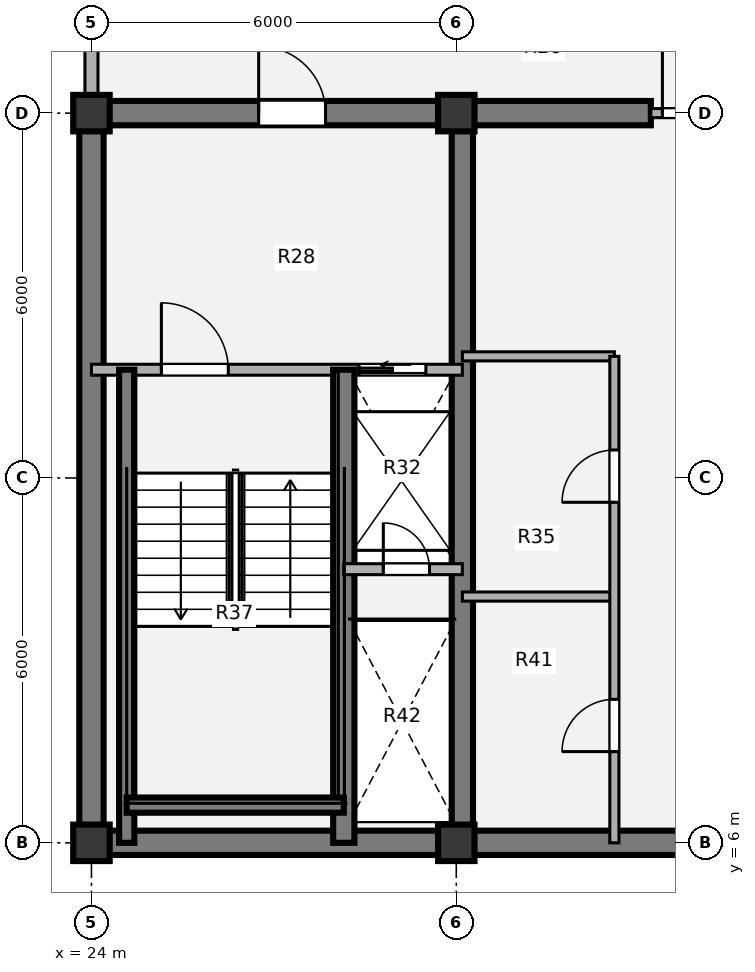
"""IFC4 building model, lengths in metres.
Left out: names, types, materials, properties, quantities, classifications, styles, units other than length and angle.
Written with IfcOpenShell. Run it as: python <this file> out.ifc"""

import sys

from ifc_helpers import new_model, si_unit, direction, frame, frame_2d, origin, origin_2d, place, context, subcontext, project, spatial, rectangle, extrude, source, transform, mapped, element, fill, save


model = new_model("IFC4")
c1 = context("Model", 3, precision=1e-05, world=origin(), true_north=direction((0.0, 1.0)))
c2 = subcontext(c1, "Body", "Model", "MODEL_VIEW")
j1 = project(units=[si_unit("LENGTHUNIT", "METRE"), si_unit("PLANEANGLEUNIT", "RADIAN")], contexts=[c1])
p1 = place(None, origin())
s1 = spatial("IfcSite", under=j1, at=p1, CompositionType="ELEMENT")
p2 = place(p1, origin())
s2 = spatial("IfcBuilding", under=s1, at=p2, CompositionType="ELEMENT")
p3 = place(p2, frame((0.0, 0.0, 238.14)))
s3 = spatial("IfcBuildingStorey", under=s2, at=p3, CompositionType="ELEMENT", Elevation=238.14)
m1 = source(origin(), c2, "Body", "SweptSolid", [
    extrude(rectangle(XDim=0.6, YDim=0.6, at=origin_2d()), origin(), (0.0, 0.0, 1.0), 3.78),
])
for number, where, z_axis, x_axis in (
    (1, (24.0, 6.0, 0.0), (0.0, 0.0, 1.0), (1.0, 0.0, 0.0)),
    (2, (30.0, 6.0, 0.0), (0.0, 0.0, 1.0), (1.0, 0.0, 0.0)),
    (3, (24.0, 18.0, 0.0), (0.0, 0.0, 1.0), (1.0, 0.0, 0.0)),
    (4, (30.0, 18.0, 0.0), (0.0, 0.0, 1.0), (1.0, 0.0, 0.0)),
):
    element("IfcColumn", number, at=place(p3, frame(where, z_axis=z_axis, x_axis=x_axis)), inside=s3, PredefinedType="COLUMN", context=c2, shape_type="MappedRepresentation", body=[
        mapped(m1, transform((0.0, 0.0, 0.0), x_axis=(1.0, 0.0, 0.0), y_axis=(0.0, 1.0, 0.0), z_axis=(0.0, 0.0, 1.0), scale=1.0)),
    ])
p4 = place(p3, frame((48.2, 6.0, 0.0), z_axis=(0.0, 0.0, 1.0), x_axis=(-1.0, 0.0, 0.0)))
e5 = element("IfcWall", 5, at=p4, inside=s3, PredefinedType="SHEAR", context=c2, shape_type="SweptSolid", body=[
    extrude(rectangle(XDim=24.4, YDim=0.4, at=frame_2d((12.2, 0.0))), origin(), (0.0, 0.0, 1.0), 3.78),
])
p5 = place(p3, frame((24.0, 6.0, 0.0), z_axis=(0.0, 0.0, 1.0), x_axis=(0.0, 1.0, 0.0)))
e6 = element("IfcWall", 6, at=p5, inside=s3, PredefinedType="SHEAR", context=c2, shape_type="SweptSolid", body=[
    extrude(rectangle(XDim=12.0, YDim=0.4, at=frame_2d((6.0, 0.0))), origin(), (0.0, 0.0, 1.0), 3.78),
])
p6 = place(p3, frame((23.8, 18.0, 0.0), z_axis=(0.0, 0.0, 1.0), x_axis=(1.0, 0.0, 0.0)))
e7 = element("IfcWall", 7, at=p6, inside=s3, PredefinedType="SHEAR", context=c2, shape_type="SweptSolid", body=[
    extrude(rectangle(XDim=9.4, YDim=0.4, at=frame_2d((4.7, 0.0))), origin(), (0.0, 0.0, 1.0), 3.78),
])
p7 = place(p6, frame((2.95, 0.0, 0.0)))
e8 = element("IfcOpeningElement", 8, at=p7, cuts=e7, PredefinedType="OPENING", context=c2, shape_type="SweptSolid", body=[
    extrude(rectangle(XDim=1.1, YDim=2.1, at=origin_2d()), frame((0.55, 0.21, 1.05), z_axis=(0.0, -1.0, 0.0), x_axis=(1.0, 0.0, 0.0)), (0.0, 0.0, 1.0), 0.42),
])
p8 = place(p3, frame((30.1, 6.0, 0.0), z_axis=(0.0, 0.0, 1.0), x_axis=(0.0, 1.0, 0.0)))
e9 = element("IfcWall", 9, at=p8, inside=s3, PredefinedType="SHEAR", context=c2, shape_type="SweptSolid", body=[
    extrude(rectangle(XDim=12.0, YDim=0.35, at=frame_2d((6.0, 0.0))), origin(), (0.0, 0.0, 1.0), 3.78),
])
p9 = place(p3, frame((24.0, 18.28, 0.0), z_axis=(0.0, 0.0, 1.0), x_axis=(0.0, 1.0, 0.0)))
e10 = element("IfcWall", 10, at=p9, inside=s3, PredefinedType="SOLIDWALL", context=c2, shape_type="SweptSolid", body=[
    extrude(rectangle(XDim=2.77, YDim=0.215, at=frame_2d((1.385, 0.0))), origin(), (0.0, 0.0, 1.0), 2.718),
])
for number, where, z_axis, x_axis in (
    (11, (30.1, 14.0, 0.0), (0.0, 0.0, 1.0), (1.0, 0.0, 0.0)),
    (12, (30.1, 10.05, 0.0), (0.0, 0.0, 1.0), (1.0, 0.0, 0.0)),
):
    element("IfcWall", number, at=place(p3, frame(where, z_axis=z_axis, x_axis=x_axis)), inside=s3, PredefinedType="PARTITIONING", context=c2, shape_type="SweptSolid", body=[
        extrude(rectangle(XDim=2.5, YDim=0.15, at=frame_2d((1.25, 0.0))), origin(), (0.0, 0.0, 1.0), 3.5),
    ])
p10 = place(p3, frame((32.6, 6.0, 0.0), z_axis=(0.0, 0.0, 1.0), x_axis=(0.0, 1.0, 0.0)))
e13 = element("IfcWall", 13, at=p10, inside=s3, PredefinedType="PARTITIONING", context=c2, shape_type="SweptSolid", body=[
    extrude(rectangle(XDim=8.0, YDim=0.15, at=frame_2d((4.0, 0.0))), origin(), (0.0, 0.0, 1.0), 3.5),
])
p11 = place(p10, frame((1.5, 0.0, 0.0)))
e14 = element("IfcOpeningElement", 14, at=p11, cuts=e13, PredefinedType="OPENING", context=c2, shape_type="SweptSolid", body=[
    extrude(rectangle(XDim=0.86, YDim=2.1, at=origin_2d()), frame((0.43, 0.085, 1.05), z_axis=(0.0, -1.0, 0.0), x_axis=(1.0, 0.0, 0.0)), (0.0, 0.0, 1.0), 0.17),
])
p12 = place(p10, frame((5.6, 0.0, 0.0)))
e15 = element("IfcOpeningElement", 15, at=p12, cuts=e13, PredefinedType="OPENING", context=c2, shape_type="SweptSolid", body=[
    extrude(rectangle(XDim=0.86, YDim=2.1, at=origin_2d()), frame((0.43, 0.085, 1.05), z_axis=(0.0, -1.0, 0.0), x_axis=(1.0, 0.0, 0.0)), (0.0, 0.0, 1.0), 0.17),
])
p13 = place(p3, frame((33.2, 18.0, 0.0), z_axis=(0.0, 0.0, 1.0), x_axis=(1.0, 0.0, 0.0)))
e16 = element("IfcWall", 16, at=p13, inside=s3, PredefinedType="PARTITIONING", context=c2, shape_type="SweptSolid", body=[
    extrude(rectangle(XDim=5.6, YDim=0.15, at=frame_2d((2.8, 0.0))), origin(), (0.0, 0.0, 1.0), 2.515),
])
p14 = place(p13, frame((0.19, 0.0, 0.0)))
e17 = element("IfcOpeningElement", 17, at=p14, cuts=e16, PredefinedType="OPENING", context=c2, shape_type="SweptSolid", body=[
    extrude(rectangle(XDim=1.1, YDim=2.1, at=origin_2d()), frame((0.55, 0.085, 1.05), z_axis=(0.0, -1.0, 0.0), x_axis=(1.0, 0.0, 0.0)), (0.0, 0.0, 1.0), 0.17),
])
p15 = place(p13, frame((4.31, 0.0, 0.0)))
e18 = element("IfcOpeningElement", 18, at=p15, cuts=e16, PredefinedType="OPENING", context=c2, shape_type="SweptSolid", body=[
    extrude(rectangle(XDim=1.1, YDim=2.1, at=origin_2d()), frame((0.55, 0.085, 1.05), z_axis=(0.0, -1.0, 0.0), x_axis=(1.0, 0.0, 0.0)), (0.0, 0.0, 1.0), 0.17),
])
p16 = place(p3, frame((24.0, 13.78, 0.0), z_axis=(0.0, 0.0, 1.0), x_axis=(1.0, 0.0, 0.0)))
e19 = element("IfcWall", 19, at=p16, inside=s3, PredefinedType="PARTITIONING", context=c2, shape_type="SweptSolid", body=[
    extrude(rectangle(XDim=6.1, YDim=0.18, at=frame_2d((3.05, 0.0))), origin(), (0.0, 0.0, 1.0), 3.5),
])
p17 = place(p16, frame((1.15, 0.0, 0.0)))
e20 = element("IfcOpeningElement", 20, at=p17, cuts=e19, PredefinedType="OPENING", context=c2, shape_type="SweptSolid", body=[
    extrude(rectangle(XDim=1.1, YDim=2.1, at=origin_2d()), frame((0.55, 0.1, 1.05), z_axis=(0.0, -1.0, 0.0), x_axis=(1.0, 0.0, 0.0)), (0.0, 0.0, 1.0), 0.2),
])
p18 = place(p16, frame((4.4, 0.0, 0.0)))
e21 = element("IfcOpeningElement", 21, at=p18, cuts=e19, PredefinedType="OPENING", context=c2, shape_type="SweptSolid", body=[
    extrude(rectangle(XDim=1.1, YDim=2.1, at=origin_2d()), frame((0.55, 0.1, 1.05), z_axis=(0.0, -1.0, 0.0), x_axis=(1.0, 0.0, 0.0)), (0.0, 0.0, 1.0), 0.2),
])
p19 = place(p3, frame((28.15, 6.0, 0.0), z_axis=(0.0, 0.0, 1.0), x_axis=(0.0, 1.0, 0.0)))
e22 = element("IfcWall", 22, at=p19, inside=s3, PredefinedType="SHEAR", context=c2, shape_type="SweptSolid", body=[
    extrude(rectangle(XDim=7.78, YDim=0.35, at=frame_2d((3.89, 0.0))), origin(), (0.0, 0.0, 1.0), 3.85),
])
p20 = place(p3, frame((24.58, 6.0, 0.0), z_axis=(0.0, 0.0, 1.0), x_axis=(0.0, 1.0, 0.0)))
e23 = element("IfcWall", 23, at=p20, inside=s3, PredefinedType="SHEAR", context=c2, shape_type="SweptSolid", body=[
    extrude(rectangle(XDim=7.78, YDim=0.25, at=frame_2d((3.89, 0.0))), origin(), (0.0, 0.0, 1.0), 3.85),
])
p21 = place(p3, frame((24.58, 6.62, 0.0), z_axis=(0.0, 0.0, 1.0), x_axis=(1.0, 0.0, 0.0)))
e24 = element("IfcWall", 24, at=p21, inside=s3, PredefinedType="SHEAR", context=c2, shape_type="SweptSolid", body=[
    extrude(rectangle(XDim=3.57, YDim=0.25, at=frame_2d((1.785, 0.0))), origin(), (0.0, 0.0, 1.0), 3.85),
])
p22 = place(p3, frame((28.15, 10.5, 0.0), z_axis=(0.0, 0.0, 1.0), x_axis=(1.0, 0.0, 0.0)))
e25 = element("IfcWall", 25, at=p22, inside=s3, PredefinedType="PARTITIONING", context=c2, shape_type="SweptSolid", body=[
    extrude(rectangle(XDim=1.95, YDim=0.18, at=frame_2d((0.975, 0.0))), origin(), (0.0, 0.0, 1.0), 3.5),
])
p23 = place(p22, frame((0.65, 0.0, 0.0)))
e26 = element("IfcOpeningElement", 26, at=p23, cuts=e25, PredefinedType="OPENING", context=c2, shape_type="SweptSolid", body=[
    extrude(rectangle(XDim=0.76, YDim=2.05, at=origin_2d()), frame((0.38, 0.1, 1.025), z_axis=(0.0, -1.0, 0.0), x_axis=(1.0, 0.0, 0.0)), (0.0, 0.0, 1.0), 0.2),
])
m2 = source(origin(), c2, "Body", "SweptSolid", [
    extrude(rectangle(XDim=0.86, YDim=2.1, at=origin_2d()), frame((0.43, 0.025, 1.05), z_axis=(0.0, -1.0, 0.0), x_axis=(1.0, 0.0, 0.0)), (0.0, 0.0, 1.0), 0.05),
])
p24 = place(p11, origin())
e27 = element("IfcDoor", 27, at=p24, inside=s3, OperationType="SINGLE_SWING_LEFT", PredefinedType="DOOR", context=c2, shape_type="MappedRepresentation", body=[
    mapped(m2, transform((0.0, 0.0, 0.0), x_axis=(1.0, 0.0, 0.0), y_axis=(0.0, 1.0, 0.0), z_axis=(0.0, 0.0, 1.0), scale=1.0)),
])
fill(e14, e27)
p25 = place(p12, origin())
e28 = element("IfcDoor", 28, at=p25, inside=s3, OperationType="SINGLE_SWING_LEFT", PredefinedType="DOOR", context=c2, shape_type="MappedRepresentation", body=[
    mapped(m2, transform((0.0, 0.0, 0.0), x_axis=(1.0, 0.0, 0.0), y_axis=(0.0, 1.0, 0.0), z_axis=(0.0, 0.0, 1.0), scale=1.0)),
])
fill(e15, e28)
m3 = source(origin(), c2, "Body", "SweptSolid", [
    extrude(rectangle(XDim=1.1, YDim=2.1, at=origin_2d()), frame((0.55, 0.025, 1.05), z_axis=(0.0, -1.0, 0.0), x_axis=(1.0, 0.0, 0.0)), (0.0, 0.0, 1.0), 0.05),
])
p26 = place(p14, origin())
e29 = element("IfcDoor", 29, at=p26, inside=s3, OperationType="SINGLE_SWING_LEFT", PredefinedType="DOOR", context=c2, shape_type="MappedRepresentation", body=[
    mapped(m3, transform((0.0, 0.0, 0.0), x_axis=(1.0, 0.0, 0.0), y_axis=(0.0, 1.0, 0.0), z_axis=(0.0, 0.0, 1.0), scale=1.0)),
])
fill(e17, e29)
m4 = source(origin(), c2, "Body", "SweptSolid", [
    extrude(rectangle(XDim=1.1, YDim=2.1, at=origin_2d()), frame((0.55, 0.025, 1.05), z_axis=(0.0, -1.0, 0.0), x_axis=(1.0, 0.0, 0.0)), (0.0, 0.0, 1.0), 0.05),
])
p27 = place(p17, origin())
e30 = element("IfcDoor", 30, at=p27, inside=s3, OperationType="SINGLE_SWING_LEFT", PredefinedType="DOOR", context=c2, shape_type="MappedRepresentation", body=[
    mapped(m4, transform((0.0, 0.0, 0.0), x_axis=(1.0, 0.0, 0.0), y_axis=(0.0, 1.0, 0.0), z_axis=(0.0, 0.0, 1.0), scale=1.0)),
])
fill(e20, e30)
m5 = source(origin(), c2, "Body", "SweptSolid", [
    extrude(rectangle(XDim=1.1, YDim=2.1, at=origin_2d()), frame((0.55, 0.025, 1.05), z_axis=(0.0, -1.0, 0.0), x_axis=(1.0, 0.0, 0.0)), (0.0, 0.0, 1.0), 0.05),
])
p28 = place(p18, origin())
e31 = element("IfcDoor", 31, at=p28, inside=s3, OperationType="SLIDING_TO_LEFT", PredefinedType="DOOR", context=c2, shape_type="MappedRepresentation", body=[
    mapped(m5, transform((0.0, 0.0, 0.0), x_axis=(1.0, 0.0, 0.0), y_axis=(0.0, 1.0, 0.0), z_axis=(0.0, 0.0, 1.0), scale=1.0)),
])
fill(e21, e31)
m6 = source(origin(), c2, "Body", "SweptSolid", [
    extrude(rectangle(XDim=0.76, YDim=2.05, at=origin_2d()), frame((0.38, 0.025, 1.025), z_axis=(0.0, -1.0, 0.0), x_axis=(1.0, 0.0, 0.0)), (0.0, 0.0, 1.0), 0.05),
])
p29 = place(p23, origin())
e32 = element("IfcDoor", 32, at=p29, inside=s3, OperationType="SINGLE_SWING_LEFT", PredefinedType="DOOR", context=c2, shape_type="MappedRepresentation", body=[
    mapped(m6, transform((0.0, 0.0, 0.0), x_axis=(1.0, 0.0, 0.0), y_axis=(0.0, 1.0, 0.0), z_axis=(0.0, 0.0, 1.0), scale=1.0)),
])
fill(e26, e32)
p30 = place(p7, origin())
e33 = element("IfcDoor", 33, at=p30, inside=s3, OperationType="SINGLE_SWING_LEFT", PredefinedType="DOOR", context=c2, shape_type="MappedRepresentation", body=[
    mapped(m3, transform((0.0, 0.0, 0.0), x_axis=(1.0, 0.0, 0.0), y_axis=(0.0, 1.0, 0.0), z_axis=(0.0, 0.0, 1.0), scale=1.0)),
])
fill(e8, e33)
save(model, sys.argv[1])
